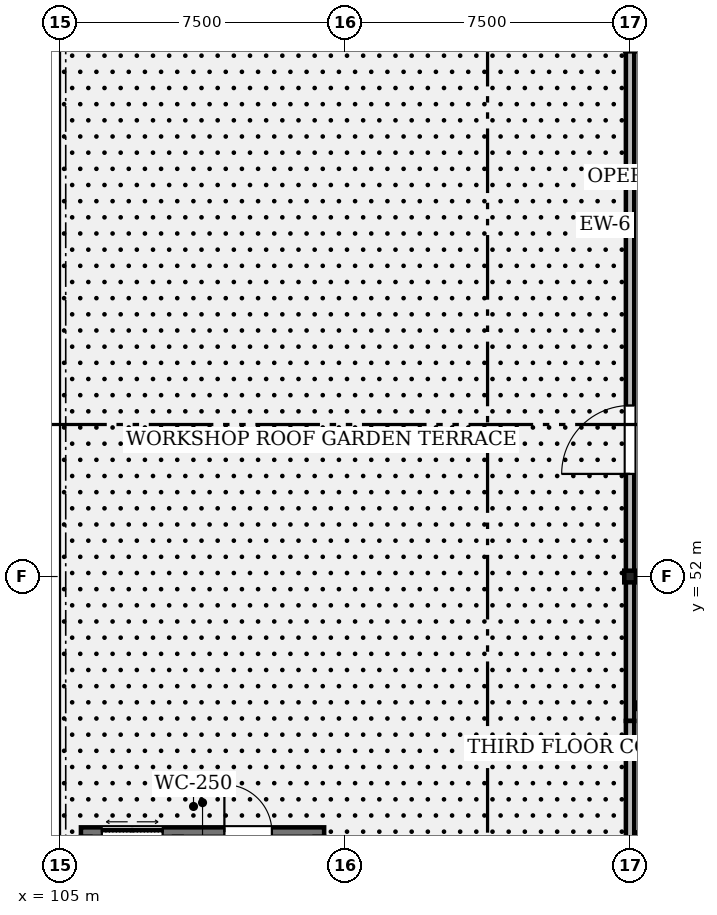
"""IFC4 building model, lengths in metres.
Left out: names, types, materials, properties, quantities, classifications, styles, units other than length and angle.
Written with IfcOpenShell. Run it as: python <this file> out.ifc"""

import sys

from ifc_helpers import new_model, si_unit, direction, frame, frame_2d, origin, origin_2d, place, context, subcontext, project, spatial, rectangle, i_section, extrude, element, fill, save


model = new_model("IFC4")
c1 = context("Model", 3, precision=1e-05, world=origin(), true_north=direction((0.0, 1.0)))
c2 = subcontext(c1, "Body", "Model", "MODEL_VIEW")
j1 = project(units=[si_unit("LENGTHUNIT", "METRE"), si_unit("PLANEANGLEUNIT", "RADIAN")], contexts=[c1])
p1 = place(None, origin())
s1 = spatial("IfcSite", under=j1, at=p1, CompositionType="ELEMENT")
p2 = place(p1, origin())
s2 = spatial("IfcBuilding", under=s1, at=p2, CompositionType="ELEMENT")
p3 = place(p2, frame((0.0, 0.0, 13.5)))
s3 = spatial("IfcBuildingStorey", under=s2, at=p3, CompositionType="ELEMENT", Elevation=13.5)
p4 = place(p3, frame((120.0, 52.0, 0.0), z_axis=(0.0, 0.0, 1.0), x_axis=(1.0, 0.0, 0.0)))
e1 = element("IfcColumn", 1, at=p4, inside=s3, PredefinedType="COLUMN", context=c2, shape_type="SweptSolid", body=[
    extrude(i_section(OverallWidth=0.305, OverallDepth=0.308, WebThickness=0.01, FlangeThickness=0.015, FilletRadius=0.015, at=origin_2d()), origin(), (0.0, 0.0, 1.0), 4.26),
])
p5 = place(p3, frame((120.0, 48.2, 0.0), z_axis=(0.0, 0.0, 1.0), x_axis=(0.0, 1.0, 0.0)))
e2 = element("IfcWall", 2, at=p5, inside=s3, PredefinedType="SOLIDWALL", context=c2, shape_type="SweptSolid", body=[
    extrude(rectangle(XDim=17.8, YDim=0.22, at=frame_2d((8.9, 0.0))), origin(), (0.0, 0.0, 1.0), 3.285),
])
p6 = place(p5, frame((6.5, 0.0, 0.0)))
e3 = element("IfcOpeningElement", 3, at=p6, cuts=e2, PredefinedType="OPENING", context=c2, shape_type="SweptSolid", body=[
    extrude(rectangle(XDim=1.8, YDim=2.15, at=frame_2d((0.9, 1.075))), frame((0.0, 0.12, 0.0), z_axis=(0.0, -1.0, 0.0), x_axis=(1.0, 0.0, 0.0)), (0.0, 0.0, 1.0), 0.24),
])
p7 = place(p3, frame((120.0, 38.0, 0.0), z_axis=(0.0, 0.0, 1.0), x_axis=(0.0, 1.0, 0.0)))
e4 = element("IfcWall", 4, at=p7, inside=s3, PredefinedType="SOLIDWALL", context=c2, shape_type="SweptSolid", body=[
    extrude(rectangle(XDim=10.2, YDim=0.22, at=frame_2d((5.1, 0.0))), origin(), (0.0, 0.0, 1.0), 3.285),
])
p8 = place(p3, frame((105.55, 45.275, 0.0), z_axis=(0.0, 0.0, 1.0), x_axis=(1.0, 0.0, 0.0)))
e5 = element("IfcWall", 5, at=p8, inside=s3, PredefinedType="SHEAR", context=c2, shape_type="SweptSolid", body=[
    extrude(rectangle(XDim=6.4, YDim=0.25, at=frame_2d((3.2, 0.0))), origin(), (0.0, 0.0, 1.0), 3.55),
])
p9 = place(p8, frame((0.55, 0.0, 0.0)))
e6 = element("IfcOpeningElement", 6, at=p9, cuts=e5, PredefinedType="OPENING", context=c2, shape_type="SweptSolid", body=[
    extrude(rectangle(XDim=1.6, YDim=2.25, at=frame_2d((0.8, 1.125))), frame((0.0, 0.135, 0.0), z_axis=(0.0, -1.0, 0.0), x_axis=(1.0, 0.0, 0.0)), (0.0, 0.0, 1.0), 0.27),
])
p10 = place(p8, frame((3.775, 0.0, 0.0)))
e7 = element("IfcOpeningElement", 7, at=p10, cuts=e5, PredefinedType="OPENING", context=c2, shape_type="SweptSolid", body=[
    extrude(rectangle(XDim=1.25, YDim=2.15, at=frame_2d((0.625, 1.075))), frame((0.0, 0.135, 0.0), z_axis=(0.0, -1.0, 0.0), x_axis=(1.0, 0.0, 0.0)), (0.0, 0.0, 1.0), 0.27),
])
p11 = place(p3, frame((120.16, 45.2, 0.0), z_axis=(0.0, 0.0, 1.0), x_axis=(1.0, 0.0, 0.0)))
e8 = element("IfcWall", 8, at=p11, inside=s3, PredefinedType="PARTITIONING", context=c2, shape_type="SweptSolid", body=[
    extrude(rectangle(XDim=11.84, YDim=0.138, at=frame_2d((5.92, 0.0))), origin(), (0.0, 0.0, 1.0), 3.7),
])
p12 = place(p11, frame((2.635, 0.0, 0.0)))
e9 = element("IfcOpeningElement", 9, at=p12, cuts=e8, PredefinedType="OPENING", context=c2, shape_type="SweptSolid", body=[
    extrude(rectangle(XDim=1.3, YDim=2.14, at=frame_2d((0.65, 1.07))), frame((0.0, 0.079, 0.0), z_axis=(0.0, -1.0, 0.0), x_axis=(1.0, 0.0, 0.0)), (0.0, 0.0, 1.0), 0.158),
])
p13 = place(p3, frame((120.16, 48.6, 0.0), z_axis=(0.0, 0.0, 1.0), x_axis=(1.0, 0.0, 0.0)))
e10 = element("IfcWall", 10, at=p13, inside=s3, PredefinedType="PARTITIONING", context=c2, shape_type="SweptSolid", body=[
    extrude(rectangle(XDim=15.84, YDim=0.168, at=frame_2d((7.92, 0.0))), origin(), (0.0, 0.0, 1.0), 3.7),
])
p14 = place(p13, frame((10.785, 0.0, 0.0)))
e11 = element("IfcOpeningElement", 11, at=p14, cuts=e10, PredefinedType="OPENING", context=c2, shape_type="SweptSolid", body=[
    extrude(rectangle(XDim=1.46, YDim=2.2, at=frame_2d((0.73, 1.1))), frame((0.0, 0.094, 0.0), z_axis=(0.0, -1.0, 0.0), x_axis=(1.0, 0.0, 0.0)), (0.0, 0.0, 1.0), 0.188),
])
p15 = place(p6, origin())
e12 = element("IfcDoor", 12, at=p15, inside=s3, OperationType="SINGLE_SWING_LEFT", PredefinedType="DOOR", context=c2, shape_type="SweptSolid", body=[
    extrude(rectangle(XDim=1.8, YDim=2.15, at=frame_2d((0.9, 1.075))), frame((0.0, 0.025, 0.0), z_axis=(0.0, -1.0, 0.0), x_axis=(1.0, 0.0, 0.0)), (0.0, 0.0, 1.0), 0.05),
])
fill(e3, e12)
p16 = place(p9, origin())
e13 = element("IfcDoor", 13, at=p16, inside=s3, OperationType="DOUBLE_DOOR_SLIDING", PredefinedType="DOOR", context=c2, shape_type="SweptSolid", body=[
    extrude(rectangle(XDim=1.6, YDim=2.25, at=frame_2d((0.8, 1.125))), frame((0.0, 0.025, 0.0), z_axis=(0.0, -1.0, 0.0), x_axis=(1.0, 0.0, 0.0)), (0.0, 0.0, 1.0), 0.05),
])
fill(e6, e13)
p17 = place(p10, origin())
e14 = element("IfcDoor", 14, at=p17, inside=s3, OperationType="SINGLE_SWING_LEFT", PredefinedType="DOOR", context=c2, shape_type="SweptSolid", body=[
    extrude(rectangle(XDim=1.25, YDim=2.15, at=frame_2d((0.625, 1.075))), frame((0.0, 0.025, 0.0), z_axis=(0.0, -1.0, 0.0), x_axis=(1.0, 0.0, 0.0)), (0.0, 0.0, 1.0), 0.05),
])
fill(e7, e14)
save(model, sys.argv[1])
